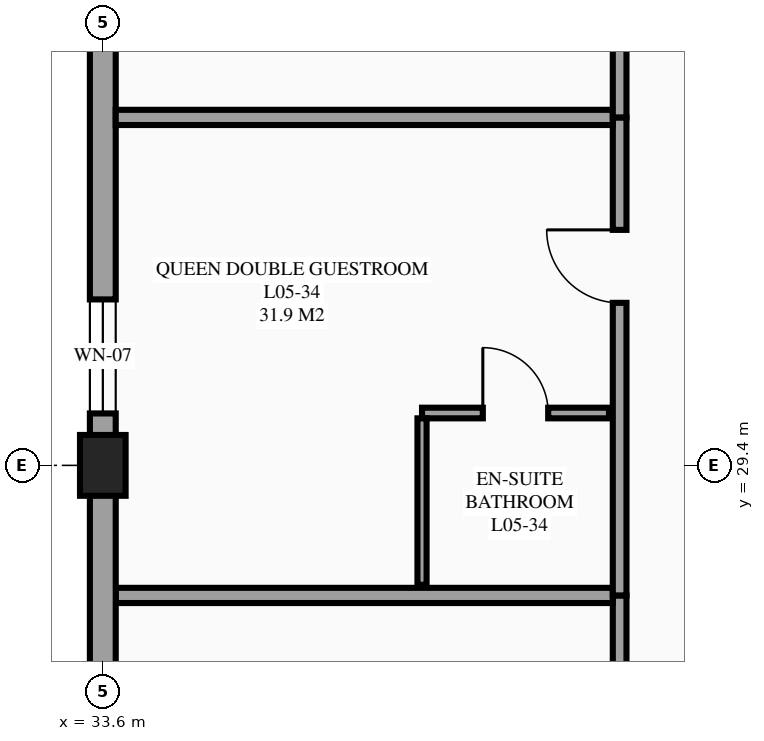
"""IFC4 building model, lengths in metres.
Left out: names, types, materials, properties, quantities, classifications, styles, units other than length and angle.
Written with IfcOpenShell. Run it as: python <this file> out.ifc"""

import sys

from ifc_helpers import new_model, si_unit, direction, frame, frame_2d, origin, origin_2d, place, context, subcontext, project, spatial, rectangle, extrude, element, fill, save


model = new_model("IFC4")
c1 = context("Model", 3, precision=1e-05, world=origin(), true_north=direction((0.0, 1.0)))
c2 = subcontext(c1, "Body", "Model", "MODEL_VIEW")
j1 = project(units=[si_unit("LENGTHUNIT", "METRE"), si_unit("PLANEANGLEUNIT", "RADIAN")], contexts=[c1])
p1 = place(None, origin())
s1 = spatial("IfcSite", under=j1, at=p1, CompositionType="ELEMENT")
p2 = place(p1, origin())
s2 = spatial("IfcBuilding", under=s1, at=p2, CompositionType="ELEMENT")
p3 = place(p2, frame((0.0, 0.0, 21.9)))
s3 = spatial("IfcBuildingStorey", under=s2, at=p3, CompositionType="ELEMENT", Elevation=21.9)
p4 = place(p3, frame((33.6, 29.4, 0.0), z_axis=(0.0, 0.0, 1.0), x_axis=(1.0, 0.0, 0.0)))
e1 = element("IfcColumn", 1, at=p4, inside=s3, PredefinedType="COLUMN", context=c2, shape_type="SweptSolid", body=[
    extrude(rectangle(XDim=0.6, YDim=0.8, at=origin_2d()), origin(), (0.0, 0.0, 1.0), 3.6),
])
p5 = place(p3, frame((33.6, 46.2, 0.0), z_axis=(0.0, 0.0, 1.0), x_axis=(0.0, -1.0, 0.0)))
e2 = element("IfcWall", 2, at=p5, inside=s3, PredefinedType="STANDARD", context=c2, shape_type="SweptSolid", body=[
    extrude(rectangle(XDim=16.8, YDim=0.34, at=frame_2d((8.4, 0.0))), origin(), (0.0, 0.0, 1.0), 2.48),
])
p6 = place(p5, frame((14.617, 0.0, 0.85)))
e3 = element("IfcOpeningElement", 3, at=p6, cuts=e2, PredefinedType="OPENING", context=c2, shape_type="SweptSolid", body=[
    extrude(rectangle(XDim=1.5, YDim=1.5, at=frame_2d((0.75, 0.75))), frame((0.0, 0.18, 0.0), z_axis=(0.0, -1.0, 0.0), x_axis=(1.0, 0.0, 0.0)), (0.0, 0.0, 1.0), 0.36),
])
p7 = place(p5, frame((9.078, 0.0, 0.85)))
e4 = element("IfcOpeningElement", 4, at=p7, cuts=e2, PredefinedType="OPENING", context=c2, shape_type="SweptSolid", body=[
    extrude(rectangle(XDim=1.5, YDim=1.5, at=frame_2d((0.75, 0.75))), frame((0.0, 0.18, 0.0), z_axis=(0.0, -1.0, 0.0), x_axis=(1.0, 0.0, 0.0)), (0.0, 0.0, 1.0), 0.36),
])
p8 = place(p5, frame((2.039, 0.0, 0.85)))
e5 = element("IfcOpeningElement", 5, at=p8, cuts=e2, PredefinedType="OPENING", context=c2, shape_type="SweptSolid", body=[
    extrude(rectangle(XDim=1.5, YDim=1.5, at=frame_2d((0.75, 0.75))), frame((0.0, 0.18, 0.0), z_axis=(0.0, -1.0, 0.0), x_axis=(1.0, 0.0, 0.0)), (0.0, 0.0, 1.0), 0.36),
])
p9 = place(p3, frame((40.4, 21.4, 0.0), z_axis=(0.0, 0.0, 1.0), x_axis=(0.0, 1.0, 0.0)))
e6 = element("IfcWall", 6, at=p9, inside=s3, PredefinedType="PARTITIONING", context=c2, shape_type="SweptSolid", body=[
    extrude(rectangle(XDim=6.289, YDim=0.18, at=frame_2d((3.145, 0.0))), origin(), (0.0, 0.0, 1.0), 3.375),
])
p10 = place(p9, frame((3.849, 0.0, 0.0)))
e7 = element("IfcOpeningElement", 7, at=p10, cuts=e6, PredefinedType="OPENING", context=c2, shape_type="SweptSolid", body=[
    extrude(rectangle(XDim=0.96, YDim=2.15, at=frame_2d((0.48, 1.075))), frame((0.0, 0.1, 0.0), z_axis=(0.0, -1.0, 0.0), x_axis=(1.0, 0.0, 0.0)), (0.0, 0.0, 1.0), 0.2),
])
p11 = place(p3, frame((33.77, 27.689, 0.0), z_axis=(0.0, 0.0, 1.0), x_axis=(1.0, 0.0, 0.0)))
e8 = element("IfcWall", 8, at=p11, inside=s3, PredefinedType="PARTITIONING", context=c2, shape_type="SweptSolid", body=[
    extrude(rectangle(XDim=6.54, YDim=0.2, at=frame_2d((3.27, 0.0))), origin(), (0.0, 0.0, 1.0), 3.375),
])
p12 = place(p3, frame((40.4, 27.689, 0.0), z_axis=(0.0, 0.0, 1.0), x_axis=(0.0, 1.0, 0.0)))
e9 = element("IfcWall", 9, at=p12, inside=s3, PredefinedType="PARTITIONING", context=c2, shape_type="SweptSolid", body=[
    extrude(rectangle(XDim=6.289, YDim=0.18, at=frame_2d((3.145, 0.0))), origin(), (0.0, 0.0, 1.0), 3.375),
])
p13 = place(p12, frame((3.849, 0.0, 0.0)))
e10 = element("IfcOpeningElement", 10, at=p13, cuts=e9, PredefinedType="OPENING", context=c2, shape_type="SweptSolid", body=[
    extrude(rectangle(XDim=0.96, YDim=2.15, at=frame_2d((0.48, 1.075))), frame((0.0, 0.1, 0.0), z_axis=(0.0, -1.0, 0.0), x_axis=(1.0, 0.0, 0.0)), (0.0, 0.0, 1.0), 0.2),
])
p14 = place(p3, frame((33.77, 33.978, 0.0), z_axis=(0.0, 0.0, 1.0), x_axis=(1.0, 0.0, 0.0)))
e11 = element("IfcWall", 11, at=p14, inside=s3, PredefinedType="PARTITIONING", context=c2, shape_type="SweptSolid", body=[
    extrude(rectangle(XDim=6.54, YDim=0.2, at=frame_2d((3.27, 0.0))), origin(), (0.0, 0.0, 1.0), 3.375),
])
p15 = place(p3, frame((37.8, 30.089, 0.0), z_axis=(0.0, 0.0, 1.0), x_axis=(1.0, 0.0, 0.0)))
e12 = element("IfcWall", 12, at=p15, inside=s3, PredefinedType="PARTITIONING", context=c2, shape_type="SweptSolid", body=[
    extrude(rectangle(XDim=2.46, YDim=0.14, at=frame_2d((1.23, 0.0))), origin(), (0.0, 0.0, 1.0), 3.375),
])
p16 = place(p15, frame((0.8, 0.0, 0.0)))
e13 = element("IfcOpeningElement", 13, at=p16, cuts=e12, PredefinedType="OPENING", context=c2, shape_type="SweptSolid", body=[
    extrude(rectangle(XDim=0.86, YDim=2.1, at=frame_2d((0.43, 1.05))), frame((0.0, 0.08, 0.0), z_axis=(0.0, -1.0, 0.0), x_axis=(1.0, 0.0, 0.0)), (0.0, 0.0, 1.0), 0.16),
])
p17 = place(p3, frame((37.8, 27.829, 0.0), z_axis=(0.0, 0.0, 1.0), x_axis=(0.0, 1.0, 0.0)))
e14 = element("IfcWall", 14, at=p17, inside=s3, PredefinedType="PARTITIONING", context=c2, shape_type="SweptSolid", body=[
    extrude(rectangle(XDim=2.19, YDim=0.12, at=frame_2d((1.095, 0.0))), origin(), (0.0, 0.0, 1.0), 3.375),
])
p18 = place(p3, frame((40.4, 33.978, 0.0), z_axis=(0.0, 0.0, 1.0), x_axis=(0.0, 1.0, 0.0)))
e15 = element("IfcWall", 15, at=p18, inside=s3, PredefinedType="PARTITIONING", context=c2, shape_type="SweptSolid", body=[
    extrude(rectangle(XDim=6.289, YDim=0.18, at=frame_2d((3.145, 0.0))), origin(), (0.0, 0.0, 1.0), 3.375),
])
p19 = place(p18, frame((1.479, 0.0, 0.0)))
e16 = element("IfcOpeningElement", 16, at=p19, cuts=e15, PredefinedType="OPENING", context=c2, shape_type="SweptSolid", body=[
    extrude(rectangle(XDim=0.96, YDim=2.15, at=frame_2d((0.48, 1.075))), frame((0.0, 0.1, 0.0), z_axis=(0.0, -1.0, 0.0), x_axis=(1.0, 0.0, 0.0)), (0.0, 0.0, 1.0), 0.2),
])
p20 = place(p3, frame((33.6, 29.4, 0.0), z_axis=(0.0, 0.0, 1.0), x_axis=(0.0, -1.0, 0.0)))
e17 = element("IfcWall", 17, at=p20, inside=s3, PredefinedType="STANDARD", context=c2, shape_type="SweptSolid", body=[
    extrude(rectangle(XDim=8.4, YDim=0.34, at=frame_2d((4.2, 0.0))), origin(), (0.0, 0.0, 1.0), 2.88),
])
p21 = place(p20, frame((4.106, 0.0, 0.85)))
e18 = element("IfcOpeningElement", 18, at=p21, cuts=e17, PredefinedType="OPENING", context=c2, shape_type="SweptSolid", body=[
    extrude(rectangle(XDim=1.5, YDim=1.5, at=frame_2d((0.75, 0.75))), frame((0.0, 0.18, 0.0), z_axis=(0.0, -1.0, 0.0), x_axis=(1.0, 0.0, 0.0)), (0.0, 0.0, 1.0), 0.36),
])
p22 = place(p6, origin())
e19 = element("IfcWindow", 19, at=p22, inside=s3, PartitioningType="SINGLE_PANEL", PredefinedType="WINDOW", context=c2, shape_type="SweptSolid", body=[
    extrude(rectangle(XDim=1.5, YDim=1.5, at=frame_2d((0.75, 0.75))), frame((0.0, 0.03, 0.0), z_axis=(0.0, -1.0, 0.0), x_axis=(1.0, 0.0, 0.0)), (0.0, 0.0, 1.0), 0.06),
])
fill(e3, e19)
p23 = place(p13, origin())
e20 = element("IfcDoor", 20, at=p23, inside=s3, OperationType="SINGLE_SWING_RIGHT", PredefinedType="DOOR", context=c2, shape_type="SweptSolid", body=[
    extrude(rectangle(XDim=0.96, YDim=2.15, at=frame_2d((0.48, 1.075))), frame((0.0, 0.025, 0.0), z_axis=(0.0, -1.0, 0.0), x_axis=(1.0, 0.0, 0.0)), (0.0, 0.0, 1.0), 0.05),
])
fill(e10, e20)
p24 = place(p16, origin())
e21 = element("IfcDoor", 21, at=p24, inside=s3, OperationType="SINGLE_SWING_LEFT", PredefinedType="DOOR", context=c2, shape_type="SweptSolid", body=[
    extrude(rectangle(XDim=0.86, YDim=2.1, at=frame_2d((0.43, 1.05))), frame((0.0, 0.025, 0.0), z_axis=(0.0, -1.0, 0.0), x_axis=(1.0, 0.0, 0.0)), (0.0, 0.0, 1.0), 0.05),
])
fill(e13, e21)
save(model, sys.argv[1])
